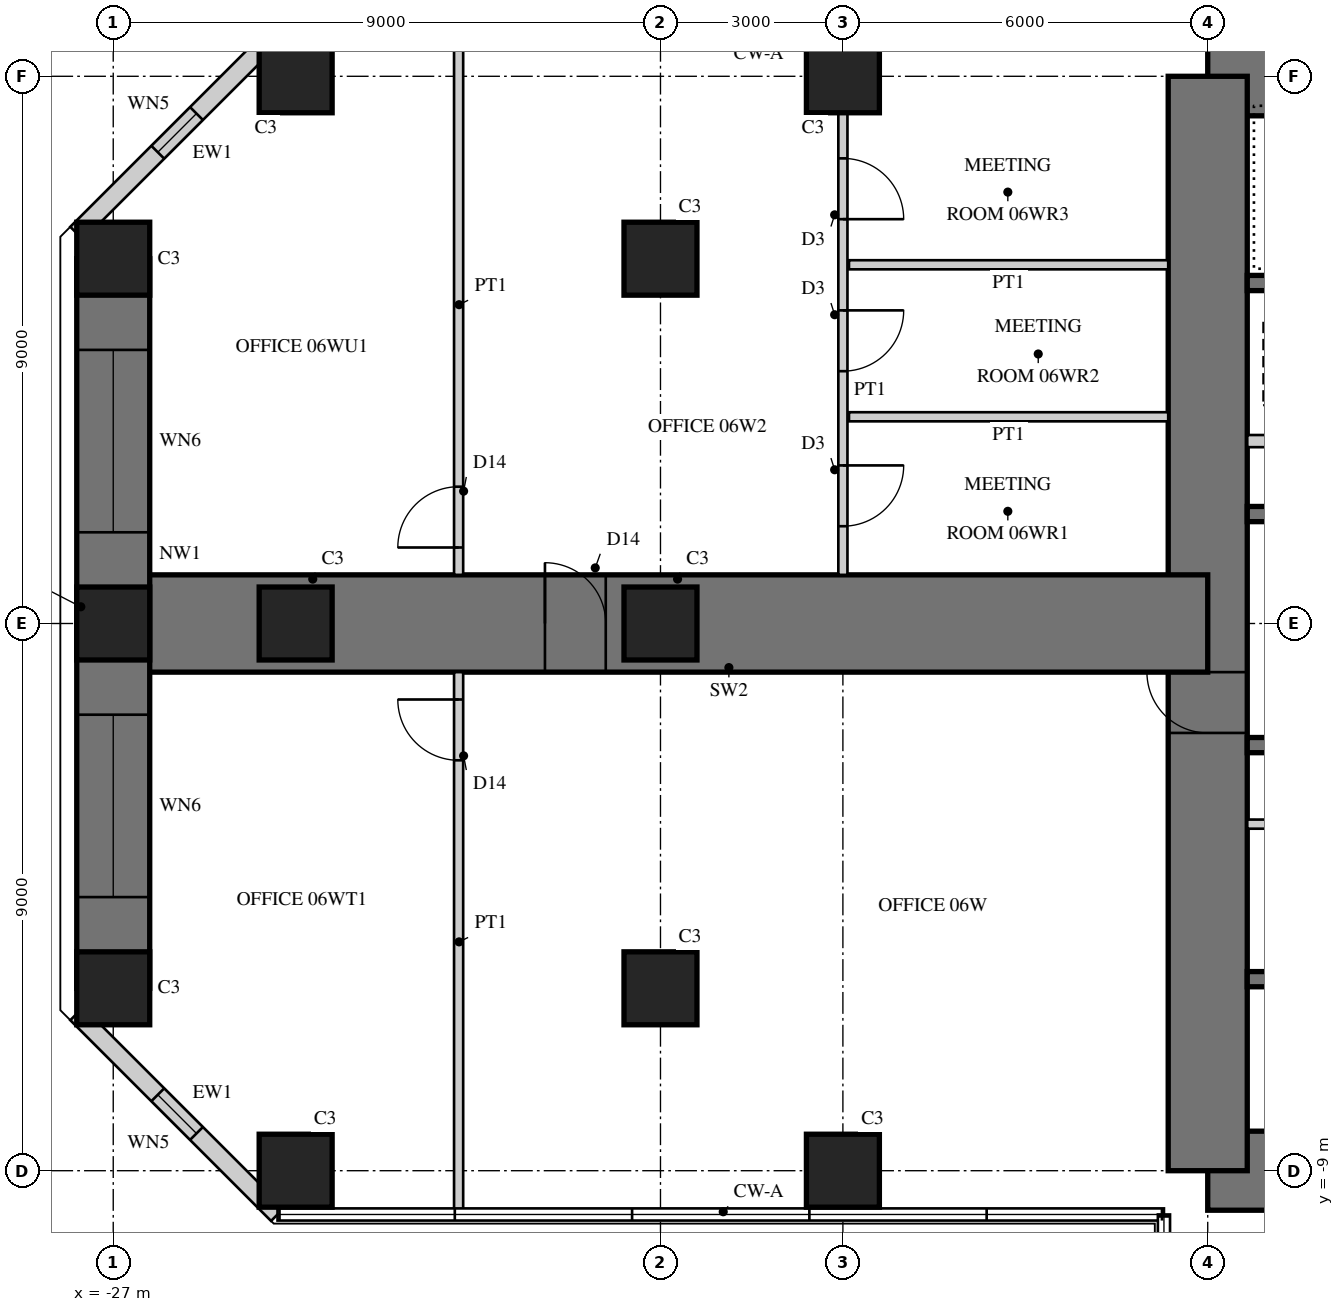
"""IFC4 building model, lengths in metres.
Left out: names, types, materials, properties, quantities, classifications, styles, units other than length and angle.
Written with IfcOpenShell. Run it as: python <this file> out.ifc"""

import sys

from ifc_helpers import new_model, si_unit, direction, frame, frame_2d, origin, origin_2d, place, context, subcontext, project, spatial, rectangle, hollow_rectangle, extrude, element, fill, save


model = new_model("IFC4")
c1 = context("Model", 3, precision=1e-05, world=origin(), true_north=direction((0.0, 1.0)))
c2 = subcontext(c1, "Body", "Model", "MODEL_VIEW")
j1 = project(units=[si_unit("LENGTHUNIT", "METRE"), si_unit("PLANEANGLEUNIT", "RADIAN")], contexts=[c1])
p1 = place(None, origin())
s1 = spatial("IfcSite", under=j1, at=p1, CompositionType="ELEMENT")
p2 = place(p1, origin())
s2 = spatial("IfcBuilding", under=s1, at=p2, CompositionType="ELEMENT")
p3 = place(p2, frame((0.0, 0.0, 27.5)))
s3 = spatial("IfcBuildingStorey", under=s2, at=p3, CompositionType="ELEMENT", Elevation=27.5)
p4 = place(p3, frame((9.0, 9.0, 0.0), z_axis=(0.0, 0.0, 1.0), x_axis=(-1.0, 0.0, 0.0)))
e1 = element("IfcWall", 1, at=p4, inside=s3, PredefinedType="SHEAR", context=c2, shape_type="SweptSolid", body=[
    extrude(rectangle(XDim=18.0, YDim=1.3, at=frame_2d((9.0, 0.0))), origin(), (0.0, 0.0, 1.0), 4.0),
])
p5 = place(p4, frame((9.8, 0.0, 0.0)))
e2 = element("IfcOpeningElement", 2, at=p5, cuts=e1, PredefinedType="OPENING", context=c2, shape_type="SweptSolid", body=[
    extrude(rectangle(XDim=1.0, YDim=2.4, at=frame_2d((0.5, 1.2))), frame((0.0, 0.66, 0.0), z_axis=(0.0, -1.0, 0.0), x_axis=(1.0, 0.0, 0.0)), (0.0, 0.0, 1.0), 1.32),
])
p6 = place(p3, frame((-9.0, -9.0, 0.0), z_axis=(0.0, 0.0, 1.0), x_axis=(1.0, 0.0, 0.0)))
e3 = element("IfcWall", 3, at=p6, inside=s3, PredefinedType="SHEAR", context=c2, shape_type="SweptSolid", body=[
    extrude(rectangle(XDim=18.0, YDim=1.3, at=frame_2d((9.0, 0.0))), origin(), (0.0, 0.0, 1.0), 4.0),
])
p7 = place(p6, frame((9.8, 0.0, 0.0)))
e4 = element("IfcOpeningElement", 4, at=p7, cuts=e3, PredefinedType="OPENING", context=c2, shape_type="SweptSolid", body=[
    extrude(rectangle(XDim=1.0, YDim=2.4, at=frame_2d((0.5, 1.2))), frame((0.0, 0.66, 0.0), z_axis=(0.0, -1.0, 0.0), x_axis=(1.0, 0.0, 0.0)), (0.0, 0.0, 1.0), 1.32),
])
p8 = place(p3, frame((-9.0, 9.0, 0.0), z_axis=(0.0, 0.0, 1.0), x_axis=(0.0, -1.0, 0.0)))
e5 = element("IfcWall", 5, at=p8, inside=s3, PredefinedType="SHEAR", context=c2, shape_type="SweptSolid", body=[
    extrude(rectangle(XDim=18.0, YDim=1.3, at=frame_2d((9.0, 0.0))), origin(), (0.0, 0.0, 1.0), 4.0),
])
p9 = place(p8, frame((9.8, 0.0, 0.0)))
e6 = element("IfcOpeningElement", 6, at=p9, cuts=e5, PredefinedType="OPENING", context=c2, shape_type="SweptSolid", body=[
    extrude(rectangle(XDim=1.0, YDim=2.4, at=frame_2d((0.5, 1.2))), frame((0.0, 0.66, 0.0), z_axis=(0.0, -1.0, 0.0), x_axis=(1.0, 0.0, 0.0)), (0.0, 0.0, 1.0), 1.32),
])
p10 = place(p3, frame((-2.125, 1.8, 0.0), z_axis=(0.0, 0.0, 1.0), x_axis=(-1.0, 0.0, 0.0)))
e7 = element("IfcWall", 7, at=p10, inside=s3, PredefinedType="SHEAR", context=c2, shape_type="SweptSolid", body=[
    extrude(rectangle(XDim=6.225, YDim=0.25, at=frame_2d((3.113, 0.0))), origin(), (0.0, 0.0, 1.0), 4.0),
])
p11 = place(p3, frame((-2.125, 5.6, 0.0), z_axis=(0.0, 0.0, 1.0), x_axis=(-1.0, 0.0, 0.0)))
e8 = element("IfcWall", 8, at=p11, inside=s3, PredefinedType="SHEAR", context=c2, shape_type="SweptSolid", body=[
    extrude(rectangle(XDim=6.225, YDim=0.25, at=frame_2d((3.113, 0.0))), origin(), (0.0, 0.0, 1.0), 4.0),
])
p12 = place(p11, frame((0.175, 0.0, 0.0)))
e9 = element("IfcOpeningElement", 9, at=p12, cuts=e8, PredefinedType="OPENING", context=c2, shape_type="SweptSolid", body=[
    extrude(rectangle(XDim=1.0, YDim=2.1, at=frame_2d((0.5, 1.05))), frame((0.0, 0.135, 0.0), z_axis=(0.0, -1.0, 0.0), x_axis=(1.0, 0.0, 0.0)), (0.0, 0.0, 1.0), 0.27),
])
p13 = place(p3, frame((-5.725, 3.0, 0.0), z_axis=(0.0, 0.0, 1.0), x_axis=(-1.0, 0.0, 0.0)))
e10 = element("IfcWall", 10, at=p13, inside=s3, PredefinedType="PARTITIONING", context=c2, shape_type="SweptSolid", body=[
    extrude(rectangle(XDim=2.625, YDim=0.2, at=frame_2d((1.312, 0.0))), origin(), (0.0, 0.0, 1.0), 4.0),
])
for number, where, z_axis, x_axis in (
    (11, (-1.925, -2.0, 0.0), (0.0, 0.0, 1.0), (-1.0, 0.0, 0.0)),
    (12, (-1.925, -5.85, 0.0), (0.0, 0.0, 1.0), (-1.0, 0.0, 0.0)),
):
    element("IfcWall", number, at=place(p3, frame(where, z_axis=z_axis, x_axis=x_axis)), inside=s3, PredefinedType="SHEAR", context=c2, shape_type="SweptSolid", body=[
        extrude(rectangle(XDim=6.425, YDim=0.25, at=frame_2d((3.212, 0.0))), origin(), (0.0, 0.0, 1.0), 4.0),
    ])
p14 = place(p3, frame((-1.925, -3.3, 0.0), z_axis=(0.0, 0.0, 1.0), x_axis=(-1.0, 0.0, 0.0)))
e13 = element("IfcWall", 13, at=p14, inside=s3, PredefinedType="PARTITIONING", context=c2, shape_type="SweptSolid", body=[
    extrude(rectangle(XDim=6.425, YDim=0.15, at=frame_2d((3.212, 0.0))), origin(), (0.0, 0.0, 1.0), 4.0),
])
p15 = place(p14, frame((0.075, 0.0, 0.0)))
e14 = element("IfcOpeningElement", 14, at=p15, cuts=e13, PredefinedType="OPENING", context=c2, shape_type="SweptSolid", body=[
    extrude(rectangle(XDim=0.8, YDim=2.1, at=frame_2d((0.4, 1.05))), frame((0.0, 0.085, 0.0), z_axis=(0.0, -1.0, 0.0), x_axis=(1.0, 0.0, 0.0)), (0.0, 0.0, 1.0), 0.17),
])
p16 = place(p14, frame((3.675, 0.0, 0.0)))
e15 = element("IfcOpeningElement", 15, at=p16, cuts=e13, PredefinedType="OPENING", context=c2, shape_type="SweptSolid", body=[
    extrude(rectangle(XDim=0.8, YDim=2.1, at=frame_2d((0.4, 1.05))), frame((0.0, 0.085, 0.0), z_axis=(0.0, -1.0, 0.0), x_axis=(1.0, 0.0, 0.0)), (0.0, 0.0, 1.0), 0.17),
])
p17 = place(p3, frame((-9.0, 0.0, 0.0), z_axis=(0.0, 0.0, 1.0), x_axis=(-1.0, 0.0, 0.0)))
e16 = element("IfcWall", 16, at=p17, inside=s3, PredefinedType="SHEAR", context=c2, shape_type="SweptSolid", body=[
    extrude(rectangle(XDim=18.0, YDim=1.6, at=frame_2d((9.0, 0.0))), origin(), (0.0, 0.0, 1.0), 4.0),
])
p18 = place(p17, frame((9.9, 0.0, 0.0)))
e17 = element("IfcOpeningElement", 17, at=p18, cuts=e16, PredefinedType="OPENING", context=c2, shape_type="SweptSolid", body=[
    extrude(rectangle(XDim=1.0, YDim=2.2, at=frame_2d((0.5, 1.1))), frame((0.0, 0.81, 0.0), z_axis=(0.0, -1.0, 0.0), x_axis=(1.0, 0.0, 0.0)), (0.0, 0.0, 1.0), 1.62),
])
p19 = place(p3, frame((-27.0, 6.0, 0.0), z_axis=(0.0, 0.0, 1.0), x_axis=(0.0, -1.0, 0.0)))
e18 = element("IfcWall", 18, at=p19, inside=s3, PredefinedType="SHEAR", context=c2, shape_type="SweptSolid", body=[
    extrude(rectangle(XDim=12.0, YDim=1.2, at=frame_2d((6.0, 0.0))), origin(), (0.0, 0.0, 1.0), 4.0),
])
p20 = place(p19, frame((1.5, 0.0, 0.6)))
e19 = element("IfcOpeningElement", 19, at=p20, cuts=e18, PredefinedType="OPENING", context=c2, shape_type="SweptSolid", body=[
    extrude(rectangle(XDim=3.0, YDim=2.4, at=frame_2d((1.5, 1.2))), frame((0.0, 0.61, 0.0), z_axis=(0.0, -1.0, 0.0), x_axis=(1.0, 0.0, 0.0)), (0.0, 0.0, 1.0), 1.22),
])
p21 = place(p19, frame((7.5, 0.0, 0.6)))
e20 = element("IfcOpeningElement", 20, at=p21, cuts=e18, PredefinedType="OPENING", context=c2, shape_type="SweptSolid", body=[
    extrude(rectangle(XDim=3.0, YDim=2.4, at=frame_2d((1.5, 1.2))), frame((0.0, 0.61, 0.0), z_axis=(0.0, -1.0, 0.0), x_axis=(1.0, 0.0, 0.0)), (0.0, 0.0, 1.0), 1.22),
])
for number, where, z_axis, x_axis in (
    (21, (-15.0, 9.0, 0.0), (0.0, 0.0, 1.0), (1.0, 0.0, 0.0)),
    (22, (-24.0, 9.0, 0.0), (0.0, 0.0, 1.0), (1.0, 0.0, 0.0)),
    (23, (-15.0, -9.0, 0.0), (0.0, 0.0, 1.0), (1.0, 0.0, 0.0)),
    (24, (-24.0, -9.0, 0.0), (0.0, 0.0, 1.0), (1.0, 0.0, 0.0)),
    (25, (-27.0, 6.0, 0.0), (0.0, 0.0, 1.0), (1.0, 0.0, 0.0)),
    (26, (-27.0, 0.0, 0.0), (0.0, 0.0, 1.0), (1.0, 0.0, 0.0)),
    (27, (-27.0, -6.0, 0.0), (0.0, 0.0, 1.0), (1.0, 0.0, 0.0)),
    (28, (-18.0, 6.0, 0.0), (0.0, 0.0, 1.0), (1.0, 0.0, 0.0)),
    (29, (-18.0, 0.0, 0.0), (0.0, 0.0, 1.0), (1.0, 0.0, 0.0)),
    (30, (-18.0, -6.0, 0.0), (0.0, 0.0, 1.0), (1.0, 0.0, 0.0)),
    (31, (-24.0, 0.0, 0.0), (0.0, 0.0, 1.0), (1.0, 0.0, 0.0)),
):
    element("IfcColumn", number, at=place(p3, frame(where, z_axis=z_axis, x_axis=x_axis)), inside=s3, PredefinedType="COLUMN", context=c2, shape_type="SweptSolid", body=[
        extrude(rectangle(XDim=1.2, YDim=1.2, at=origin_2d()), origin(), (0.0, 0.0, 1.0), 4.0),
    ])
p22 = place(p3, frame((-24.298, 9.72, 0.0), z_axis=(0.0, 0.0, 1.0), x_axis=(-0.707106781187, -0.707106781187, 0.0)))
e32 = element("IfcWall", 32, at=p22, inside=s3, PredefinedType="SOLIDWALL", context=c2, shape_type="SweptSolid", body=[
    extrude(rectangle(XDim=4.669, YDim=0.3, at=frame_2d((2.335, 0.0))), origin(), (0.0, 0.0, 1.0), 3.8),
])
p23 = place(p22, frame((1.885, 0.0, 0.3)))
e33 = element("IfcOpeningElement", 33, at=p23, cuts=e32, PredefinedType="OPENING", context=c2, shape_type="SweptSolid", body=[
    extrude(rectangle(XDim=0.9, YDim=2.4, at=frame_2d((0.45, 1.2))), frame((0.0, 0.16, 0.0), z_axis=(0.0, -1.0, 0.0), x_axis=(1.0, 0.0, 0.0)), (0.0, 0.0, 1.0), 0.32),
])
p24 = place(p3, frame((-27.6, -6.418, 0.0), z_axis=(0.0, 0.0, 1.0), x_axis=(0.707106781187, -0.707106781187, 0.0)))
e34 = element("IfcWall", 34, at=p24, inside=s3, PredefinedType="SOLIDWALL", context=c2, shape_type="SweptSolid", body=[
    extrude(rectangle(XDim=4.669, YDim=0.3, at=frame_2d((2.335, 0.0))), origin(), (0.0, 0.0, 1.0), 3.8),
])
p25 = place(p24, frame((1.885, 0.0, 0.3)))
e35 = element("IfcOpeningElement", 35, at=p25, cuts=e34, PredefinedType="OPENING", context=c2, shape_type="SweptSolid", body=[
    extrude(rectangle(XDim=0.9, YDim=2.4, at=frame_2d((0.45, 1.2))), frame((0.0, 0.16, 0.0), z_axis=(0.0, -1.0, 0.0), x_axis=(1.0, 0.0, 0.0)), (0.0, 0.0, 1.0), 0.32),
])
p26 = place(p3, frame((-15.0, 8.4, 0.0), z_axis=(0.0, 0.0, 1.0), x_axis=(0.0, -1.0, 0.0)))
e36 = element("IfcWall", 36, at=p26, inside=s3, PredefinedType="PARTITIONING", context=c2, shape_type="SweptSolid", body=[
    extrude(rectangle(XDim=7.6, YDim=0.15, at=frame_2d((3.8, 0.0))), origin(), (0.0, 0.0, 1.0), 2.95),
])
p27 = place(p26, frame((0.75, 0.0, 0.0)))
e37 = element("IfcOpeningElement", 37, at=p27, cuts=e36, PredefinedType="OPENING", context=c2, shape_type="SweptSolid", body=[
    extrude(rectangle(XDim=1.0, YDim=2.1, at=frame_2d((0.5, 1.05))), frame((0.0, 0.085, 0.0), z_axis=(0.0, -1.0, 0.0), x_axis=(1.0, 0.0, 0.0)), (0.0, 0.0, 1.0), 0.17),
])
p28 = place(p26, frame((3.25, 0.0, 0.0)))
e38 = element("IfcOpeningElement", 38, at=p28, cuts=e36, PredefinedType="OPENING", context=c2, shape_type="SweptSolid", body=[
    extrude(rectangle(XDim=1.0, YDim=2.1, at=frame_2d((0.5, 1.05))), frame((0.0, 0.085, 0.0), z_axis=(0.0, -1.0, 0.0), x_axis=(1.0, 0.0, 0.0)), (0.0, 0.0, 1.0), 0.17),
])
p29 = place(p26, frame((5.8, 0.0, 0.0)))
e39 = element("IfcOpeningElement", 39, at=p29, cuts=e36, PredefinedType="OPENING", context=c2, shape_type="SweptSolid", body=[
    extrude(rectangle(XDim=1.0, YDim=2.1, at=frame_2d((0.5, 1.05))), frame((0.0, 0.085, 0.0), z_axis=(0.0, -1.0, 0.0), x_axis=(1.0, 0.0, 0.0)), (0.0, 0.0, 1.0), 0.17),
])
p30 = place(p3, frame((-9.65, 3.4, 0.0), z_axis=(0.0, 0.0, 1.0), x_axis=(-1.0, 0.0, 0.0)))
e40 = element("IfcWall", 40, at=p30, inside=s3, PredefinedType="PARTITIONING", context=c2, shape_type="SweptSolid", body=[
    extrude(rectangle(XDim=5.25, YDim=0.15, at=frame_2d((2.625, 0.0))), origin(), (0.0, 0.0, 1.0), 3.8),
])
p31 = place(p3, frame((-9.65, 5.9, 0.0), z_axis=(0.0, 0.0, 1.0), x_axis=(-1.0, 0.0, 0.0)))
e41 = element("IfcWall", 41, at=p31, inside=s3, PredefinedType="PARTITIONING", context=c2, shape_type="SweptSolid", body=[
    extrude(rectangle(XDim=5.25, YDim=0.15, at=frame_2d((2.625, 0.0))), origin(), (0.0, 0.0, 1.0), 3.0),
])
p32 = place(p3, frame((-21.32, -0.8, 0.0), z_axis=(0.0, 0.0, 1.0), x_axis=(0.0, -1.0, 0.0)))
e42 = element("IfcWall", 42, at=p32, inside=s3, PredefinedType="PARTITIONING", context=c2, shape_type="SweptSolid", body=[
    extrude(rectangle(XDim=8.88, YDim=0.15, at=frame_2d((4.44, 0.0))), origin(), (0.0, 0.0, 1.0), 3.8),
])
p33 = place(p32, frame((0.45, 0.0, 0.0)))
e43 = element("IfcOpeningElement", 43, at=p33, cuts=e42, PredefinedType="OPENING", context=c2, shape_type="SweptSolid", body=[
    extrude(rectangle(XDim=1.0, YDim=2.2, at=frame_2d((0.5, 1.1))), frame((0.0, 0.085, 0.0), z_axis=(0.0, -1.0, 0.0), x_axis=(1.0, 0.0, 0.0)), (0.0, 0.0, 1.0), 0.17),
])
p34 = place(p3, frame((-21.32, 9.68, 0.0), z_axis=(0.0, 0.0, 1.0), x_axis=(0.0, -1.0, 0.0)))
e44 = element("IfcWall", 44, at=p34, inside=s3, PredefinedType="PARTITIONING", context=c2, shape_type="SweptSolid", body=[
    extrude(rectangle(XDim=8.88, YDim=0.15, at=frame_2d((4.44, 0.0))), origin(), (0.0, 0.0, 1.0), 3.8),
])
p35 = place(p34, frame((7.43, 0.0, 0.0)))
e45 = element("IfcOpeningElement", 45, at=p35, cuts=e44, PredefinedType="OPENING", context=c2, shape_type="SweptSolid", body=[
    extrude(rectangle(XDim=1.0, YDim=2.2, at=frame_2d((0.5, 1.1))), frame((0.0, 0.085, 0.0), z_axis=(0.0, -1.0, 0.0), x_axis=(1.0, 0.0, 0.0)), (0.0, 0.0, 1.0), 0.17),
])
p36 = place(p23, origin())
e46 = element("IfcWindow", 46, at=p36, inside=s3, PartitioningType="SINGLE_PANEL", PredefinedType="WINDOW", context=c2, shape_type="SweptSolid", body=[
    extrude(hollow_rectangle(XDim=0.9, YDim=2.4, WallThickness=0.06, at=frame_2d((0.45, 1.2))), frame((0.0, 0.03, 0.0), z_axis=(0.0, -1.0, 0.0), x_axis=(1.0, 0.0, 0.0)), (0.0, 0.0, 1.0), 0.06),
    extrude(rectangle(XDim=0.779, YDim=2.279, at=frame_2d((0.45, 1.2))), frame((0.0, 0.03, 0.0), z_axis=(0.0, -1.0, 0.0), x_axis=(1.0, 0.0, 0.0)), (0.0, 0.0, 1.0), 0.06),
])
fill(e33, e46)
p37 = place(p20, origin())
e47 = element("IfcWindow", 47, at=p37, inside=s3, PartitioningType="SINGLE_PANEL", PredefinedType="WINDOW", context=c2, shape_type="SweptSolid", body=[
    extrude(hollow_rectangle(XDim=3.0, YDim=2.4, WallThickness=0.06, at=frame_2d((1.5, 1.2))), frame((0.0, 0.03, 0.0), z_axis=(0.0, -1.0, 0.0), x_axis=(1.0, 0.0, 0.0)), (0.0, 0.0, 1.0), 0.06),
    extrude(rectangle(XDim=2.879, YDim=2.279, at=frame_2d((1.5, 1.2))), frame((0.0, 0.03, 0.0), z_axis=(0.0, -1.0, 0.0), x_axis=(1.0, 0.0, 0.0)), (0.0, 0.0, 1.0), 0.06),
])
fill(e19, e47)
p38 = place(p21, origin())
e48 = element("IfcWindow", 48, at=p38, inside=s3, PartitioningType="SINGLE_PANEL", PredefinedType="WINDOW", context=c2, shape_type="SweptSolid", body=[
    extrude(hollow_rectangle(XDim=3.0, YDim=2.4, WallThickness=0.06, at=frame_2d((1.5, 1.2))), frame((0.0, 0.03, 0.0), z_axis=(0.0, -1.0, 0.0), x_axis=(1.0, 0.0, 0.0)), (0.0, 0.0, 1.0), 0.06),
    extrude(rectangle(XDim=2.879, YDim=2.279, at=frame_2d((1.5, 1.2))), frame((0.0, 0.03, 0.0), z_axis=(0.0, -1.0, 0.0), x_axis=(1.0, 0.0, 0.0)), (0.0, 0.0, 1.0), 0.06),
])
fill(e20, e48)
p39 = place(p25, origin())
e49 = element("IfcWindow", 49, at=p39, inside=s3, PartitioningType="SINGLE_PANEL", PredefinedType="WINDOW", context=c2, shape_type="SweptSolid", body=[
    extrude(hollow_rectangle(XDim=0.9, YDim=2.4, WallThickness=0.06, at=frame_2d((0.45, 1.2))), frame((0.0, 0.03, 0.0), z_axis=(0.0, -1.0, 0.0), x_axis=(1.0, 0.0, 0.0)), (0.0, 0.0, 1.0), 0.06),
    extrude(rectangle(XDim=0.779, YDim=2.279, at=frame_2d((0.45, 1.2))), frame((0.0, 0.03, 0.0), z_axis=(0.0, -1.0, 0.0), x_axis=(1.0, 0.0, 0.0)), (0.0, 0.0, 1.0), 0.06),
])
fill(e35, e49)
p40 = place(p27, origin())
e50 = element("IfcDoor", 50, at=p40, inside=s3, OperationType="SINGLE_SWING_RIGHT", PredefinedType="DOOR", context=c2, shape_type="SweptSolid", body=[
    extrude(rectangle(XDim=1.0, YDim=2.1, at=frame_2d((0.5, 1.05))), frame((0.0, 0.025, 0.0), z_axis=(0.0, -1.0, 0.0), x_axis=(1.0, 0.0, 0.0)), (0.0, 0.0, 1.0), 0.05),
])
fill(e37, e50)
p41 = place(p28, origin())
e51 = element("IfcDoor", 51, at=p41, inside=s3, OperationType="SINGLE_SWING_LEFT", PredefinedType="DOOR", context=c2, shape_type="SweptSolid", body=[
    extrude(rectangle(XDim=1.0, YDim=2.1, at=frame_2d((0.5, 1.05))), frame((0.0, 0.025, 0.0), z_axis=(0.0, -1.0, 0.0), x_axis=(1.0, 0.0, 0.0)), (0.0, 0.0, 1.0), 0.05),
])
fill(e38, e51)
p42 = place(p29, origin())
e52 = element("IfcDoor", 52, at=p42, inside=s3, OperationType="SINGLE_SWING_LEFT", PredefinedType="DOOR", context=c2, shape_type="SweptSolid", body=[
    extrude(rectangle(XDim=1.0, YDim=2.1, at=frame_2d((0.5, 1.05))), frame((0.0, 0.025, 0.0), z_axis=(0.0, -1.0, 0.0), x_axis=(1.0, 0.0, 0.0)), (0.0, 0.0, 1.0), 0.05),
])
fill(e39, e52)
p43 = place(p33, frame((1.0, 0.0, 0.0), z_axis=(0.0, 0.0, 1.0), x_axis=(-1.0, 0.0, 0.0)))
e53 = element("IfcDoor", 53, at=p43, inside=s3, OperationType="SINGLE_SWING_RIGHT", PredefinedType="DOOR", context=c2, shape_type="SweptSolid", body=[
    extrude(rectangle(XDim=1.0, YDim=2.2, at=frame_2d((0.5, 1.1))), frame((0.0, 0.025, 0.0), z_axis=(0.0, -1.0, 0.0), x_axis=(1.0, 0.0, 0.0)), (0.0, 0.0, 1.0), 0.05),
])
fill(e43, e53)
p44 = place(p35, frame((1.0, 0.0, 0.0), z_axis=(0.0, 0.0, 1.0), x_axis=(-1.0, 0.0, 0.0)))
e54 = element("IfcDoor", 54, at=p44, inside=s3, OperationType="SINGLE_SWING_LEFT", PredefinedType="DOOR", context=c2, shape_type="SweptSolid", body=[
    extrude(rectangle(XDim=1.0, YDim=2.2, at=frame_2d((0.5, 1.1))), frame((0.0, 0.025, 0.0), z_axis=(0.0, -1.0, 0.0), x_axis=(1.0, 0.0, 0.0)), (0.0, 0.0, 1.0), 0.05),
])
fill(e45, e54)
p45 = place(p18, frame((1.0, 0.0, 0.0), z_axis=(0.0, 0.0, 1.0), x_axis=(-1.0, 0.0, 0.0)))
e55 = element("IfcDoor", 55, at=p45, inside=s3, OperationType="SINGLE_SWING_LEFT", PredefinedType="DOOR", context=c2, shape_type="SweptSolid", body=[
    extrude(rectangle(XDim=1.0, YDim=2.2, at=frame_2d((0.5, 1.1))), frame((0.0, 0.025, 0.0), z_axis=(0.0, -1.0, 0.0), x_axis=(1.0, 0.0, 0.0)), (0.0, 0.0, 1.0), 0.05),
])
fill(e17, e55)
p46 = place(p9, frame((1.0, 0.0, 0.0), z_axis=(0.0, 0.0, 1.0), x_axis=(-1.0, 0.0, 0.0)))
e56 = element("IfcDoor", 56, at=p46, inside=s3, OperationType="SINGLE_SWING_RIGHT", PredefinedType="DOOR", context=c2, shape_type="SweptSolid", body=[
    extrude(rectangle(XDim=1.0, YDim=2.4, at=frame_2d((0.5, 1.2))), frame((0.0, -0.005, 0.0), z_axis=(0.0, -1.0, 0.0), x_axis=(1.0, 0.0, 0.0)), (0.0, 0.0, 1.0), 0.05),
])
fill(e6, e56)
save(model, sys.argv[1])
